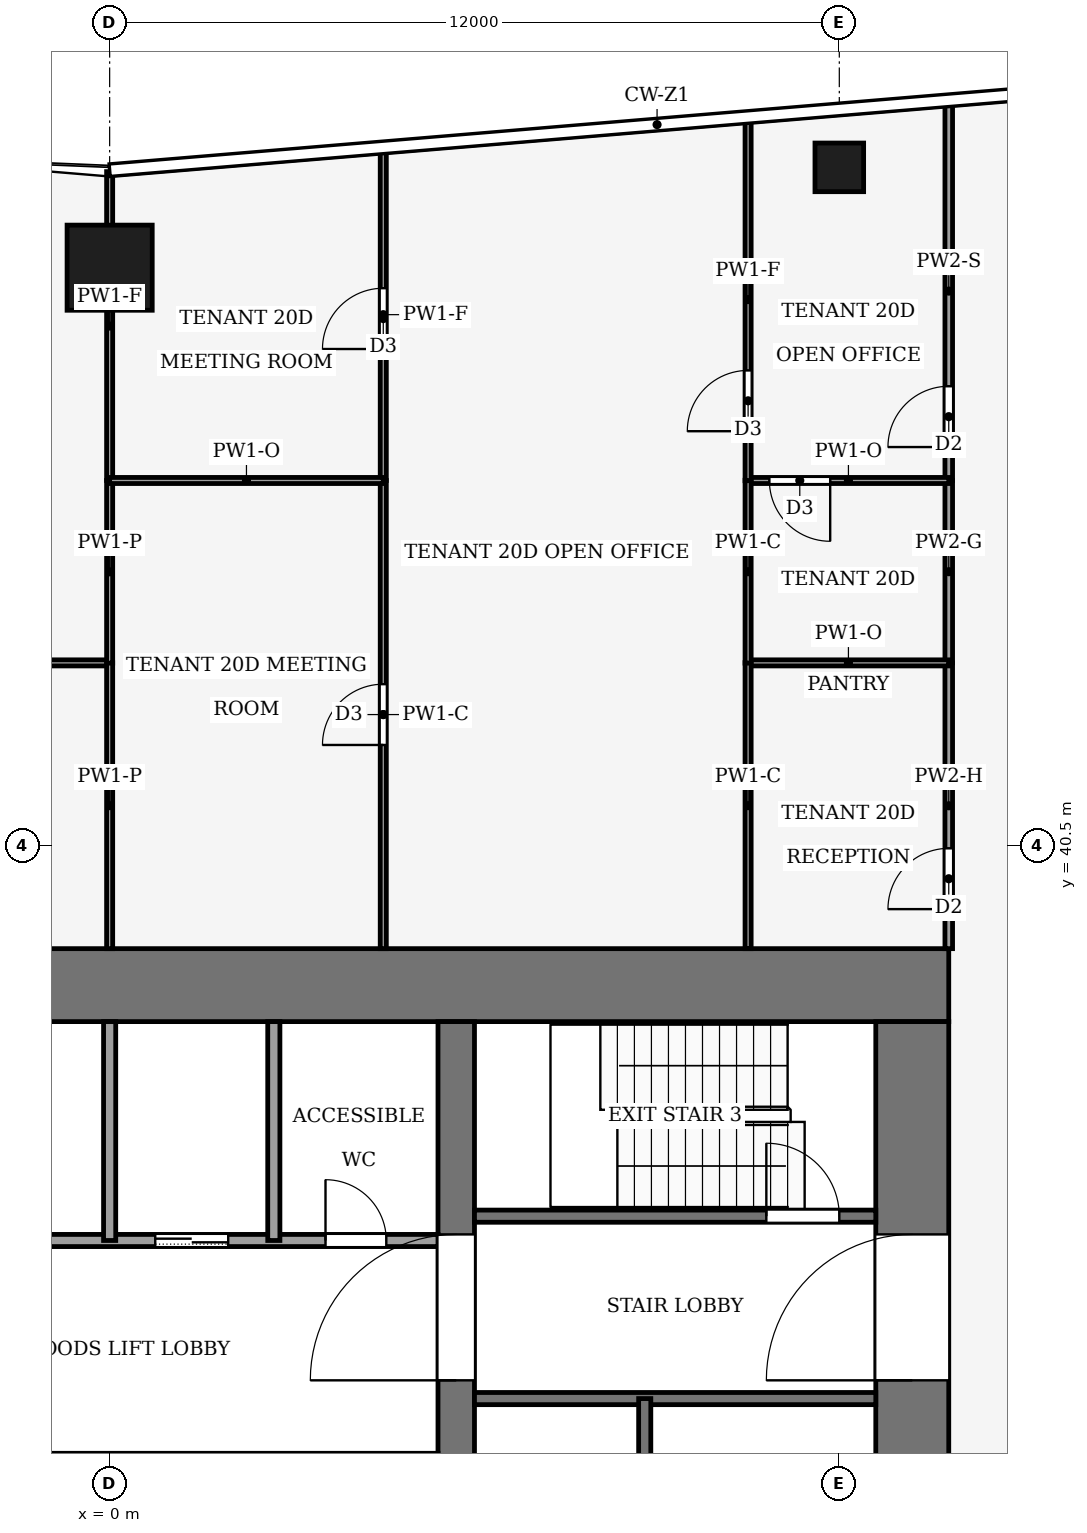
"""IFC4 building model, lengths in metres.
Left out: names, types, materials, properties, quantities, classifications, styles, units other than length and angle.
Written with IfcOpenShell. Run it as: python <this file> out.ifc"""

import sys

from ifc_helpers import new_model, si_unit, direction, frame, frame_2d, origin, origin_2d, place, context, subcontext, project, spatial, rectangle, hollow_rectangle, extrude, element, fill, save


model = new_model("IFC4")
c1 = context("Model", 3, precision=1e-05, world=origin(), true_north=direction((0.0, 1.0)))
c2 = subcontext(c1, "Body", "Model", "MODEL_VIEW")
j1 = project(units=[si_unit("LENGTHUNIT", "METRE"), si_unit("PLANEANGLEUNIT", "RADIAN")], contexts=[c1])
p1 = place(None, origin())
s1 = spatial("IfcSite", under=j1, at=p1, CompositionType="ELEMENT")
p2 = place(p1, origin())
s2 = spatial("IfcBuilding", under=s1, at=p2, CompositionType="ELEMENT")
p3 = place(p2, frame((0.0, 0.0, 90.0)))
s3 = spatial("IfcBuildingStorey", under=s2, at=p3, CompositionType="ELEMENT", Elevation=90.0)
p4 = place(p3, frame((-13.8, 38.2, -0.13), z_axis=(0.0, 0.0, 1.0), x_axis=(1.0, 0.0, 0.0)))
e1 = element("IfcWall", 1, at=p4, inside=s3, PredefinedType="SHEAR", context=c2, shape_type="SweptSolid", body=[
    extrude(rectangle(XDim=27.6, YDim=1.2, at=frame_2d((13.8, 0.0))), origin(), (0.0, 0.0, 1.0), 4.0),
])
p5 = place(p3, frame((13.2, 18.4, -0.13), z_axis=(0.0, 0.0, 1.0), x_axis=(0.0, 1.0, 0.0)))
e2 = element("IfcWall", 2, at=p5, inside=s3, PredefinedType="SHEAR", context=c2, shape_type="SweptSolid", body=[
    extrude(rectangle(XDim=19.2, YDim=1.2, at=frame_2d((9.6, 0.0))), origin(), (0.0, 0.0, 1.0), 4.0),
])
p6 = place(p5, frame((2.8, 0.0, 0.13)))
e3 = element("IfcOpeningElement", 3, at=p6, cuts=e2, PredefinedType="OPENING", context=c2, shape_type="SweptSolid", body=[
    extrude(rectangle(XDim=2.4, YDim=2.4, at=frame_2d((1.2, 1.2))), frame((0.0, 0.61, 0.0), z_axis=(0.0, -1.0, 0.0), x_axis=(1.0, 0.0, 0.0)), (0.0, 0.0, 1.0), 1.22),
])
p7 = place(p5, frame((13.3, 0.0, 0.13)))
e4 = element("IfcOpeningElement", 4, at=p7, cuts=e2, PredefinedType="OPENING", context=c2, shape_type="SweptSolid", body=[
    extrude(rectangle(XDim=2.4, YDim=2.4, at=frame_2d((1.2, 1.2))), frame((0.0, 0.61, 0.0), z_axis=(0.0, -1.0, 0.0), x_axis=(1.0, 0.0, 0.0)), (0.0, 0.0, 1.0), 1.22),
])
p8 = place(p3, frame((5.7, 18.4, -0.13), z_axis=(0.0, 0.0, 1.0), x_axis=(0.0, 1.0, 0.0)))
e5 = element("IfcWall", 5, at=p8, inside=s3, PredefinedType="SHEAR", context=c2, shape_type="SweptSolid", body=[
    extrude(rectangle(XDim=19.2, YDim=0.6, at=frame_2d((9.6, 0.0))), origin(), (0.0, 0.0, 1.0), 4.0),
])
p9 = place(p8, frame((8.35, 0.0, 0.13)))
e6 = element("IfcOpeningElement", 6, at=p9, cuts=e5, PredefinedType="OPENING", context=c2, shape_type="SweptSolid", body=[
    extrude(rectangle(XDim=0.9, YDim=2.1, at=frame_2d((0.45, 1.05))), frame((0.0, 0.31, 0.0), z_axis=(0.0, -1.0, 0.0), x_axis=(1.0, 0.0, 0.0)), (0.0, 0.0, 1.0), 0.62),
])
p10 = place(p8, frame((13.3, 0.0, 0.13)))
e7 = element("IfcOpeningElement", 7, at=p10, cuts=e5, PredefinedType="OPENING", context=c2, shape_type="SweptSolid", body=[
    extrude(rectangle(XDim=2.4, YDim=2.4, at=frame_2d((1.2, 1.2))), frame((0.0, 0.31, 0.0), z_axis=(0.0, -1.0, 0.0), x_axis=(1.0, 0.0, 0.0)), (0.0, 0.0, 1.0), 0.62),
])
p11 = place(p3, frame((0.0, 50.0, 0.0), z_axis=(0.0, 0.0, 1.0), x_axis=(1.0, 0.0, 0.0)))
e8 = element("IfcColumn", 8, at=p11, inside=s3, PredefinedType="COLUMN", context=c2, shape_type="SweptSolid", body=[
    extrude(hollow_rectangle(XDim=1.4, YDim=1.4, WallThickness=0.08, at=origin_2d()), origin(), (0.0, 0.0, 1.0), 4.0),
])
p12 = place(p3, frame((12.0, 51.65, 0.0), z_axis=(0.0, 0.0, 1.0), x_axis=(1.0, 0.0, 0.0)))
e9 = element("IfcColumn", 9, at=p12, inside=s3, PredefinedType="COLUMN", context=c2, shape_type="SweptSolid", body=[
    extrude(hollow_rectangle(XDim=0.8, YDim=0.8, WallThickness=0.04, at=origin_2d()), origin(), (0.0, 0.0, 1.0), 4.0),
])
p13 = place(p3, frame((6.0, 31.4, 0.0), z_axis=(0.0, 0.0, 1.0), x_axis=(1.0, 0.0, 0.0)))
e10 = element("IfcWall", 10, at=p13, inside=s3, PredefinedType="PARTITIONING", context=c2, shape_type="SweptSolid", body=[
    extrude(rectangle(XDim=6.6, YDim=0.2, at=frame_2d((3.3, 0.0))), origin(), (0.0, 0.0, 1.0), 3.87),
])
p14 = place(p3, frame((-5.4, 34.0, 0.0), z_axis=(0.0, 0.0, 1.0), x_axis=(1.0, 0.0, 0.0)))
e11 = element("IfcWall", 11, at=p14, inside=s3, PredefinedType="PARTITIONING", context=c2, shape_type="SweptSolid", body=[
    extrude(rectangle(XDim=10.8, YDim=0.2, at=frame_2d((5.4, 0.0))), origin(), (0.0, 0.0, 1.0), 3.87),
])
p15 = place(p14, frame((6.15, 0.0, 0.0)))
e12 = element("IfcOpeningElement", 12, at=p15, cuts=e11, PredefinedType="OPENING", context=c2, shape_type="SweptSolid", body=[
    extrude(rectangle(XDim=1.2, YDim=2.2, at=frame_2d((0.6, 1.1))), frame((0.0, 0.11, 0.0), z_axis=(0.0, -1.0, 0.0), x_axis=(1.0, 0.0, 0.0)), (0.0, 0.0, 1.0), 0.22),
])
p16 = place(p14, frame((8.95, 0.0, 0.0)))
e13 = element("IfcOpeningElement", 13, at=p16, cuts=e11, PredefinedType="OPENING", context=c2, shape_type="SweptSolid", body=[
    extrude(rectangle(XDim=1.0, YDim=2.1, at=frame_2d((0.5, 1.05))), frame((0.0, 0.11, 0.0), z_axis=(0.0, -1.0, 0.0), x_axis=(1.0, 0.0, 0.0)), (0.0, 0.0, 1.0), 0.22),
])
p17 = place(p3, frame((6.0, 34.4, 0.0), z_axis=(0.0, 0.0, 1.0), x_axis=(1.0, 0.0, 0.0)))
e14 = element("IfcWall", 14, at=p17, inside=s3, PredefinedType="PARTITIONING", context=c2, shape_type="SweptSolid", body=[
    extrude(rectangle(XDim=6.6, YDim=0.2, at=frame_2d((3.3, 0.0))), origin(), (0.0, 0.0, 1.0), 3.87),
])
p18 = place(p17, frame((4.8, 0.0, 0.0)))
e15 = element("IfcOpeningElement", 15, at=p18, cuts=e14, PredefinedType="OPENING", context=c2, shape_type="SweptSolid", body=[
    extrude(rectangle(XDim=1.2, YDim=2.2, at=frame_2d((0.6, 1.1))), frame((0.0, 0.11, 0.0), z_axis=(0.0, -1.0, 0.0), x_axis=(1.0, 0.0, 0.0)), (0.0, 0.0, 1.0), 0.22),
])
for number, where, z_axis, x_axis in (
    (16, (0.0, 34.0, 0.0), (0.0, 0.0, 1.0), (0.0, 1.0, 0.0)),
    (17, (2.7, 34.0, 0.0), (0.0, 0.0, 1.0), (0.0, 1.0, 0.0)),
):
    element("IfcWall", number, at=place(p3, frame(where, z_axis=z_axis, x_axis=x_axis)), inside=s3, PredefinedType="PARTITIONING", context=c2, shape_type="SweptSolid", body=[
        extrude(rectangle(XDim=3.6, YDim=0.2, at=frame_2d((1.8, 0.0))), origin(), (0.0, 0.0, 1.0), 3.87),
    ])
p19 = place(p3, frame((8.8, 24.0, 0.0), z_axis=(0.0, 0.0, 1.0), x_axis=(0.0, 1.0, 0.0)))
e18 = element("IfcWall", 18, at=p19, inside=s3, PredefinedType="PARTITIONING", context=c2, shape_type="SweptSolid", body=[
    extrude(rectangle(XDim=7.4, YDim=0.2, at=frame_2d((3.7, 0.0))), origin(), (0.0, 0.0, 1.0), 3.87),
])
p20 = place(p3, frame((13.8, 38.8, 0.0), z_axis=(0.0, 0.0, 1.0), x_axis=(0.0, 1.0, 0.0)))
e19 = element("IfcWall", 19, at=p20, inside=s3, PredefinedType="PARTITIONING", context=c2, shape_type="SweptSolid", body=[
    extrude(rectangle(XDim=4.7, YDim=0.125, at=frame_2d((2.35, 0.0))), origin(), (0.0, 0.0, 1.0), 3.14),
])
p21 = place(p20, frame((0.65, 0.0, 0.0)))
e20 = element("IfcOpeningElement", 20, at=p21, cuts=e19, PredefinedType="OPENING", context=c2, shape_type="SweptSolid", body=[
    extrude(rectangle(XDim=1.0, YDim=2.1, at=frame_2d((0.5, 1.05))), frame((0.0, 0.073, 0.0), z_axis=(0.0, -1.0, 0.0), x_axis=(1.0, 0.0, 0.0)), (0.0, 0.0, 1.0), 0.145),
])
p22 = place(p3, frame((13.8, 46.5, 0.0), z_axis=(0.0, 0.0, 1.0), x_axis=(0.0, -1.0, 0.0)))
e21 = element("IfcWall", 21, at=p22, inside=s3, PredefinedType="PARTITIONING", context=c2, shape_type="SweptSolid", body=[
    extrude(rectangle(XDim=3.0, YDim=0.125, at=frame_2d((1.5, 0.0))), origin(), (0.0, 0.0, 1.0), 3.87),
])
p23 = place(p3, frame((13.8, 46.5, 0.0), z_axis=(0.0, 0.0, 1.0), x_axis=(0.0, 1.0, 0.0)))
e22 = element("IfcWall", 22, at=p23, inside=s3, PredefinedType="PARTITIONING", context=c2, shape_type="SweptSolid", body=[
    extrude(rectangle(XDim=6.23, YDim=0.125, at=frame_2d((3.115, 0.0))), origin(), (0.0, 0.0, 1.0), 3.04),
])
p24 = place(p23, frame((0.55, 0.0, 0.0)))
e23 = element("IfcOpeningElement", 23, at=p24, cuts=e22, PredefinedType="OPENING", context=c2, shape_type="SweptSolid", body=[
    extrude(rectangle(XDim=1.0, YDim=2.1, at=frame_2d((0.5, 1.05))), frame((0.0, 0.073, 0.0), z_axis=(0.0, -1.0, 0.0), x_axis=(1.0, 0.0, 0.0)), (0.0, 0.0, 1.0), 0.145),
])
p25 = place(p3, frame((0.0, 43.5, 0.0), z_axis=(0.0, 0.0, 1.0), x_axis=(-1.0, 0.0, 0.0)))
e24 = element("IfcWall", 24, at=p25, inside=s3, PredefinedType="PARTITIONING", context=c2, shape_type="SweptSolid", body=[
    extrude(rectangle(XDim=10.5, YDim=0.1, at=frame_2d((5.25, 0.0))), origin(), (0.0, 0.0, 1.0), 3.39),
])
p26 = place(p25, frame((4.75, 0.0, 0.0)))
e25 = element("IfcOpeningElement", 25, at=p26, cuts=e24, PredefinedType="OPENING", context=c2, shape_type="SweptSolid", body=[
    extrude(rectangle(XDim=1.0, YDim=2.1, at=frame_2d((0.5, 1.05))), frame((0.0, 0.06, 0.0), z_axis=(0.0, -1.0, 0.0), x_axis=(1.0, 0.0, 0.0)), (0.0, 0.0, 1.0), 0.12),
])
p27 = place(p3, frame((0.0, 38.8, 0.0), z_axis=(0.0, 0.0, 1.0), x_axis=(0.0, 1.0, 0.0)))
e26 = element("IfcWall", 26, at=p27, inside=s3, PredefinedType="PARTITIONING", context=c2, shape_type="SweptSolid", body=[
    extrude(rectangle(XDim=4.704, YDim=0.1, at=frame_2d((2.352, 0.0))), origin(), (0.0, 0.0, 1.0), 3.44),
])
p28 = place(p3, frame((0.0, 43.496, 0.0), z_axis=(0.0, 0.0, 1.0), x_axis=(0.0, 1.0, 0.0)))
e27 = element("IfcWall", 27, at=p28, inside=s3, PredefinedType="PARTITIONING", context=c2, shape_type="SweptSolid", body=[
    extrude(rectangle(XDim=3.004, YDim=0.1, at=frame_2d((1.502, 0.0))), origin(), (0.0, 0.0, 1.0), 3.44),
])
p29 = place(p3, frame((0.0, 46.5, 0.0), z_axis=(0.0, 0.0, 1.0), x_axis=(0.0, 1.0, 0.0)))
e28 = element("IfcWall", 28, at=p29, inside=s3, PredefinedType="PARTITIONING", context=c2, shape_type="SweptSolid", body=[
    extrude(rectangle(XDim=5.08, YDim=0.1, at=frame_2d((2.54, 0.0))), origin(), (0.0, 0.0, 1.0), 3.04),
])
p30 = place(p3, frame((13.8, 43.5, 0.0), z_axis=(0.0, 0.0, 1.0), x_axis=(-1.0, 0.0, 0.0)))
e29 = element("IfcWall", 29, at=p30, inside=s3, PredefinedType="PARTITIONING", context=c2, shape_type="SweptSolid", body=[
    extrude(rectangle(XDim=3.3, YDim=0.1, at=frame_2d((1.65, 0.0))), origin(), (0.0, 0.0, 1.0), 3.39),
])
p31 = place(p3, frame((10.5, 43.504, 0.0), z_axis=(0.0, 0.0, 1.0), x_axis=(0.0, -1.0, 0.0)))
e30 = element("IfcWall", 30, at=p31, inside=s3, PredefinedType="PARTITIONING", context=c2, shape_type="SweptSolid", body=[
    extrude(rectangle(XDim=4.704, YDim=0.1, at=frame_2d((2.352, 0.0))), origin(), (0.0, 0.0, 1.0), 3.87),
])
p32 = place(p3, frame((13.8, 46.5, 0.0), z_axis=(0.0, 0.0, 1.0), x_axis=(-1.0, 0.0, 0.0)))
e31 = element("IfcWall", 31, at=p32, inside=s3, PredefinedType="PARTITIONING", context=c2, shape_type="SweptSolid", body=[
    extrude(rectangle(XDim=3.3, YDim=0.1, at=frame_2d((1.65, 0.0))), origin(), (0.0, 0.0, 1.0), 3.39),
])
p33 = place(p32, frame((1.95, 0.0, 0.0)))
e32 = element("IfcOpeningElement", 32, at=p33, cuts=e31, PredefinedType="OPENING", context=c2, shape_type="SweptSolid", body=[
    extrude(rectangle(XDim=1.0, YDim=2.1, at=frame_2d((0.5, 1.05))), frame((0.0, 0.06, 0.0), z_axis=(0.0, -1.0, 0.0), x_axis=(1.0, 0.0, 0.0)), (0.0, 0.0, 1.0), 0.12),
])
p34 = place(p3, frame((10.5, 46.504, 0.0), z_axis=(0.0, 0.0, 1.0), x_axis=(0.0, -1.0, 0.0)))
e33 = element("IfcWall", 33, at=p34, inside=s3, PredefinedType="PARTITIONING", context=c2, shape_type="SweptSolid", body=[
    extrude(rectangle(XDim=3.008, YDim=0.1, at=frame_2d((1.504, 0.0))), origin(), (0.0, 0.0, 1.0), 3.87),
])
p35 = place(p3, frame((10.5, 46.496, 0.0), z_axis=(0.0, 0.0, 1.0), x_axis=(0.0, 1.0, 0.0)))
e34 = element("IfcWall", 34, at=p35, inside=s3, PredefinedType="PARTITIONING", context=c2, shape_type="SweptSolid", body=[
    extrude(rectangle(XDim=5.959, YDim=0.1, at=frame_2d((2.979, 0.0))), origin(), (0.0, 0.0, 1.0), 3.04),
])
p36 = place(p35, frame((0.814, 0.0, 0.0)))
e35 = element("IfcOpeningElement", 35, at=p36, cuts=e34, PredefinedType="OPENING", context=c2, shape_type="SweptSolid", body=[
    extrude(rectangle(XDim=1.0, YDim=2.1, at=frame_2d((0.5, 1.05))), frame((0.0, 0.06, 0.0), z_axis=(0.0, -1.0, 0.0), x_axis=(1.0, 0.0, 0.0)), (0.0, 0.0, 1.0), 0.12),
])
p37 = place(p3, frame((4.5, 38.8, 0.0), z_axis=(0.0, 0.0, 1.0), x_axis=(0.0, 1.0, 0.0)))
e36 = element("IfcWall", 36, at=p37, inside=s3, PredefinedType="PARTITIONING", context=c2, shape_type="SweptSolid", body=[
    extrude(rectangle(XDim=7.7, YDim=0.1, at=frame_2d((3.85, 0.0))), origin(), (0.0, 0.0, 1.0), 3.87),
])
p38 = place(p37, frame((3.35, 0.0, 0.0)))
e37 = element("IfcOpeningElement", 37, at=p38, cuts=e36, PredefinedType="OPENING", context=c2, shape_type="SweptSolid", body=[
    extrude(rectangle(XDim=1.0, YDim=2.1, at=frame_2d((0.5, 1.05))), frame((0.0, 0.06, 0.0), z_axis=(0.0, -1.0, 0.0), x_axis=(1.0, 0.0, 0.0)), (0.0, 0.0, 1.0), 0.12),
])
p39 = place(p3, frame((4.5, 46.5, 0.0), z_axis=(0.0, 0.0, 1.0), x_axis=(0.0, 1.0, 0.0)))
e38 = element("IfcWall", 38, at=p39, inside=s3, PredefinedType="PARTITIONING", context=c2, shape_type="SweptSolid", body=[
    extrude(rectangle(XDim=5.455, YDim=0.1, at=frame_2d((2.728, 0.0))), origin(), (0.0, 0.0, 1.0), 3.04),
])
p40 = place(p39, frame((2.162, 0.0, 0.0)))
e39 = element("IfcOpeningElement", 39, at=p40, cuts=e38, PredefinedType="OPENING", context=c2, shape_type="SweptSolid", body=[
    extrude(rectangle(XDim=1.0, YDim=2.1, at=frame_2d((0.5, 1.05))), frame((0.0, 0.06, 0.0), z_axis=(0.0, -1.0, 0.0), x_axis=(1.0, 0.0, 0.0)), (0.0, 0.0, 1.0), 0.12),
])
p41 = place(p3, frame((4.5, 46.5, 0.0), z_axis=(0.0, 0.0, 1.0), x_axis=(-1.0, 0.0, 0.0)))
e40 = element("IfcWall", 40, at=p41, inside=s3, PredefinedType="PARTITIONING", context=c2, shape_type="SweptSolid", body=[
    extrude(rectangle(XDim=4.5, YDim=0.1, at=frame_2d((2.25, 0.0))), origin(), (0.0, 0.0, 1.0), 3.39),
])
p42 = place(p15, origin())
e41 = element("IfcDoor", 41, at=p42, inside=s3, OperationType="SLIDING_TO_LEFT", PredefinedType="DOOR", context=c2, shape_type="SweptSolid", body=[
    extrude(rectangle(XDim=1.2, YDim=2.2, at=frame_2d((0.6, 1.1))), frame((0.0, 0.025, 0.0), z_axis=(0.0, -1.0, 0.0), x_axis=(1.0, 0.0, 0.0)), (0.0, 0.0, 1.0), 0.05),
])
fill(e12, e41)
p43 = place(p16, origin())
e42 = element("IfcDoor", 42, at=p43, inside=s3, OperationType="SINGLE_SWING_LEFT", PredefinedType="DOOR", context=c2, shape_type="SweptSolid", body=[
    extrude(rectangle(XDim=1.0, YDim=2.1, at=frame_2d((0.5, 1.05))), frame((0.0, 0.025, 0.0), z_axis=(0.0, -1.0, 0.0), x_axis=(1.0, 0.0, 0.0)), (0.0, 0.0, 1.0), 0.05),
])
fill(e13, e42)
p44 = place(p18, origin())
e43 = element("IfcDoor", 43, at=p44, inside=s3, OperationType="SINGLE_SWING_RIGHT", PredefinedType="DOOR", context=c2, shape_type="SweptSolid", body=[
    extrude(rectangle(XDim=1.2, YDim=2.2, at=frame_2d((0.6, 1.1))), frame((0.0, 0.025, 0.0), z_axis=(0.0, -1.0, 0.0), x_axis=(1.0, 0.0, 0.0)), (0.0, 0.0, 1.0), 0.05),
])
fill(e15, e43)
p45 = place(p10, origin())
e44 = element("IfcDoor", 44, at=p45, inside=s3, OperationType="DOUBLE_DOOR_SINGLE_SWING", PredefinedType="DOOR", context=c2, shape_type="SweptSolid", body=[
    extrude(rectangle(XDim=2.4, YDim=2.4, at=frame_2d((1.2, 1.2))), frame((0.0, 0.025, 0.0), z_axis=(0.0, -1.0, 0.0), x_axis=(1.0, 0.0, 0.0)), (0.0, 0.0, 1.0), 0.05),
])
fill(e7, e44)
p46 = place(p7, origin())
e45 = element("IfcDoor", 45, at=p46, inside=s3, OperationType="DOUBLE_DOOR_SINGLE_SWING", PredefinedType="DOOR", context=c2, shape_type="SweptSolid", body=[
    extrude(rectangle(XDim=2.4, YDim=2.4, at=frame_2d((1.2, 1.2))), frame((0.0, 0.025, 0.0), z_axis=(0.0, -1.0, 0.0), x_axis=(1.0, 0.0, 0.0)), (0.0, 0.0, 1.0), 0.05),
])
fill(e4, e45)
p47 = place(p21, origin())
e46 = element("IfcDoor", 46, at=p47, inside=s3, OperationType="SINGLE_SWING_LEFT", PredefinedType="DOOR", context=c2, shape_type="SweptSolid", body=[
    extrude(rectangle(XDim=1.0, YDim=2.1, at=frame_2d((0.5, 1.05))), frame((0.0, 0.025, 0.0), z_axis=(0.0, -1.0, 0.0), x_axis=(1.0, 0.0, 0.0)), (0.0, 0.0, 1.0), 0.05),
])
fill(e20, e46)
p48 = place(p24, origin())
e47 = element("IfcDoor", 47, at=p48, inside=s3, OperationType="SINGLE_SWING_LEFT", PredefinedType="DOOR", context=c2, shape_type="SweptSolid", body=[
    extrude(rectangle(XDim=1.0, YDim=2.1, at=frame_2d((0.5, 1.05))), frame((0.0, 0.025, 0.0), z_axis=(0.0, -1.0, 0.0), x_axis=(1.0, 0.0, 0.0)), (0.0, 0.0, 1.0), 0.05),
])
fill(e23, e47)
p49 = place(p33, origin())
e48 = element("IfcDoor", 48, at=p49, inside=s3, OperationType="SINGLE_SWING_RIGHT", PredefinedType="DOOR", context=c2, shape_type="SweptSolid", body=[
    extrude(rectangle(XDim=1.0, YDim=2.1, at=frame_2d((0.5, 1.05))), frame((0.0, 0.025, 0.0), z_axis=(0.0, -1.0, 0.0), x_axis=(1.0, 0.0, 0.0)), (0.0, 0.0, 1.0), 0.05),
])
fill(e32, e48)
p50 = place(p36, origin())
e49 = element("IfcDoor", 49, at=p50, inside=s3, OperationType="SINGLE_SWING_LEFT", PredefinedType="DOOR", context=c2, shape_type="SweptSolid", body=[
    extrude(rectangle(XDim=1.0, YDim=2.1, at=frame_2d((0.5, 1.05))), frame((0.0, 0.025, 0.0), z_axis=(0.0, -1.0, 0.0), x_axis=(1.0, 0.0, 0.0)), (0.0, 0.0, 1.0), 0.05),
])
fill(e35, e49)
p51 = place(p38, origin())
e50 = element("IfcDoor", 50, at=p51, inside=s3, OperationType="SINGLE_SWING_LEFT", PredefinedType="DOOR", context=c2, shape_type="SweptSolid", body=[
    extrude(rectangle(XDim=1.0, YDim=2.1, at=frame_2d((0.5, 1.05))), frame((0.0, 0.025, 0.0), z_axis=(0.0, -1.0, 0.0), x_axis=(1.0, 0.0, 0.0)), (0.0, 0.0, 1.0), 0.05),
])
fill(e37, e50)
p52 = place(p40, origin())
e51 = element("IfcDoor", 51, at=p52, inside=s3, OperationType="SINGLE_SWING_LEFT", PredefinedType="DOOR", context=c2, shape_type="SweptSolid", body=[
    extrude(rectangle(XDim=1.0, YDim=2.1, at=frame_2d((0.5, 1.05))), frame((0.0, 0.025, 0.0), z_axis=(0.0, -1.0, 0.0), x_axis=(1.0, 0.0, 0.0)), (0.0, 0.0, 1.0), 0.05),
])
fill(e39, e51)
save(model, sys.argv[1])
